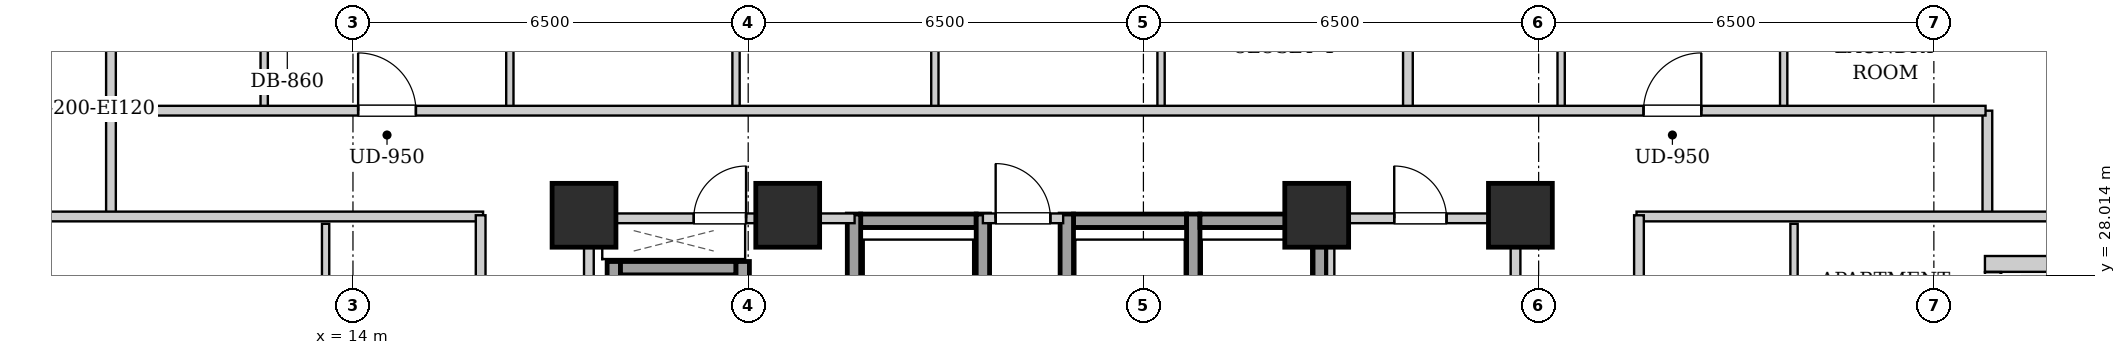
"""IFC4 building model, lengths in metres.
Left out: names, types, materials, properties, quantities, classifications, styles, units other than length and angle.
Written with IfcOpenShell. Run it as: python <this file> out.ifc"""

import sys

from ifc_helpers import new_model, si_unit, direction, frame, frame_2d, origin, origin_2d, place, context, subcontext, project, spatial, rectangle, extrude, element, fill, save


model = new_model("IFC4")
c1 = context("Model", 3, precision=1e-05, world=origin(), true_north=direction((0.0, 1.0)))
c2 = subcontext(c1, "Body", "Model", "MODEL_VIEW")
j1 = project(units=[si_unit("LENGTHUNIT", "METRE"), si_unit("PLANEANGLEUNIT", "RADIAN")], contexts=[c1])
p1 = place(None, origin())
s1 = spatial("IfcSite", under=j1, at=p1, CompositionType="ELEMENT")
p2 = place(p1, origin())
s2 = spatial("IfcBuilding", under=s1, at=p2, CompositionType="ELEMENT")
p3 = place(p2, frame((0.0, 0.0, 84.7)))
s3 = spatial("IfcBuildingStorey", under=s2, at=p3, CompositionType="ELEMENT", Elevation=84.7)
for number, where, z_axis, x_axis in (
    (1, (17.8, 29.0, 0.0), (0.0, 0.0, 1.0), (1.0, 0.0, 0.0)),
    (2, (21.15, 29.0, 0.0), (0.0, 0.0, 1.0), (1.0, 0.0, 0.0)),
    (3, (29.85, 29.0, 0.0), (0.0, 0.0, 1.0), (1.0, 0.0, 0.0)),
    (4, (33.2, 29.0, 0.0), (0.0, 0.0, 1.0), (1.0, 0.0, 0.0)),
):
    element("IfcColumn", number, at=place(p3, frame(where, z_axis=z_axis, x_axis=x_axis)), inside=s3, PredefinedType="COLUMN", context=c2, shape_type="SweptSolid", body=[
        extrude(rectangle(XDim=1.05, YDim=1.05, at=origin_2d()), origin(), (0.0, 0.0, 1.0), 3.2),
    ])
p4 = place(p3, frame((43.24, 28.2, 0.0), z_axis=(0.0, 0.0, 1.0), x_axis=(-1.0, 0.0, 0.0)))
e5 = element("IfcWall", 5, at=p4, inside=s3, PredefinedType="SOLIDWALL", context=c2, shape_type="SweptSolid", body=[
    extrude(rectangle(XDim=2.4, YDim=0.26, at=frame_2d((1.2, 0.0))), origin(), (0.0, 0.0, 1.0), 2.94),
])
p5 = place(p3, frame((40.97, 28.066, 0.0), z_axis=(0.0, 0.0, 1.0), x_axis=(0.0, -1.0, 0.0)))
e6 = element("IfcWall", 6, at=p5, inside=s3, PredefinedType="SOLIDWALL", context=c2, shape_type="SweptSolid", body=[
    extrude(rectangle(XDim=3.332, YDim=0.26, at=frame_2d((1.666, 0.0))), origin(), (0.0, 0.0, 1.0), 2.94),
])
p6 = place(p5, frame((1.116, 0.0, 0.0)))
e7 = element("IfcOpeningElement", 7, at=p6, cuts=e6, PredefinedType="OPENING", context=c2, shape_type="SweptSolid", body=[
    extrude(rectangle(XDim=1.1, YDim=2.0, at=frame_2d((0.55, 1.0))), frame((0.0, 0.14, 0.0), z_axis=(0.0, -1.0, 0.0), x_axis=(1.0, 0.0, 0.0)), (0.0, 0.0, 1.0), 0.28),
])
p7 = place(p5, frame((0.276, 0.0, 0.55)))
e8 = element("IfcOpeningElement", 8, at=p7, cuts=e6, PredefinedType="OPENING", context=c2, shape_type="SweptSolid", body=[
    extrude(rectangle(XDim=0.68, YDim=1.2, at=frame_2d((0.34, 0.6))), frame((0.0, 0.14, 0.0), z_axis=(0.0, -1.0, 0.0), x_axis=(1.0, 0.0, 0.0)), (0.0, 0.0, 1.0), 0.28),
])
p8 = place(p3, frame((22.35, 28.91, 0.0), z_axis=(0.0, 0.0, 1.0), x_axis=(1.0, 0.0, 0.0)))
e9 = element("IfcWall", 9, at=p8, inside=s3, PredefinedType="SHEAR", context=c2, shape_type="SweptSolid", body=[
    extrude(rectangle(XDim=1.9, YDim=0.22, at=frame_2d((0.95, 0.0))), origin(), (0.0, 0.0, 1.0), 2.94),
])
for number, where, z_axis, x_axis in (
    (10, (22.24, 26.58, 0.0), (0.0, 0.0, 1.0), (0.0, 1.0, 0.0)),
    (11, (24.36, 26.58, 0.0), (0.0, 0.0, 1.0), (0.0, 1.0, 0.0)),
):
    element("IfcWall", number, at=place(p3, frame(where, z_axis=z_axis, x_axis=x_axis)), inside=s3, PredefinedType="SHEAR", context=c2, shape_type="SweptSolid", body=[
        extrude(rectangle(XDim=2.44, YDim=0.22, at=frame_2d((1.22, 0.0))), origin(), (0.0, 0.0, 1.0), 2.94),
    ])
p9 = place(p3, frame((25.85, 28.91, 0.0), z_axis=(0.0, 0.0, 1.0), x_axis=(1.0, 0.0, 0.0)))
e12 = element("IfcWall", 12, at=p9, inside=s3, PredefinedType="SHEAR", context=c2, shape_type="SweptSolid", body=[
    extrude(rectangle(XDim=1.86, YDim=0.22, at=frame_2d((0.93, 0.0))), origin(), (0.0, 0.0, 1.0), 2.94),
])
for number, where, z_axis, x_axis in (
    (13, (25.74, 26.58, 0.0), (0.0, 0.0, 1.0), (0.0, 1.0, 0.0)),
    (14, (27.82, 26.58, 0.0), (0.0, 0.0, 1.0), (0.0, 1.0, 0.0)),
):
    element("IfcWall", number, at=place(p3, frame(where, z_axis=z_axis, x_axis=x_axis)), inside=s3, PredefinedType="SHEAR", context=c2, shape_type="SweptSolid", body=[
        extrude(rectangle(XDim=2.44, YDim=0.22, at=frame_2d((1.22, 0.0))), origin(), (0.0, 0.0, 1.0), 2.94),
    ])
p10 = place(p3, frame((27.93, 28.91, 0.0), z_axis=(0.0, 0.0, 1.0), x_axis=(1.0, 0.0, 0.0)))
e15 = element("IfcWall", 15, at=p10, inside=s3, PredefinedType="SHEAR", context=c2, shape_type="SweptSolid", body=[
    extrude(rectangle(XDim=1.86, YDim=0.22, at=frame_2d((0.93, 0.0))), origin(), (0.0, 0.0, 1.0), 2.94),
])
p11 = place(p3, frame((29.9, 26.58, 0.0), z_axis=(0.0, 0.0, 1.0), x_axis=(0.0, 1.0, 0.0)))
e16 = element("IfcWall", 16, at=p11, inside=s3, PredefinedType="SHEAR", context=c2, shape_type="SweptSolid", body=[
    extrude(rectangle(XDim=2.44, YDim=0.22, at=frame_2d((1.22, 0.0))), origin(), (0.0, 0.0, 1.0), 2.94),
])
p12 = place(p3, frame((18.29, 24.1, 0.0), z_axis=(0.0, 0.0, 1.0), x_axis=(0.0, 1.0, 0.0)))
e17 = element("IfcWall", 17, at=p12, inside=s3, PredefinedType="SHEAR", context=c2, shape_type="SweptSolid", body=[
    extrude(rectangle(XDim=4.14, YDim=0.22, at=frame_2d((2.07, 0.0))), origin(), (0.0, 0.0, 1.0), 2.94),
])
p13 = place(p3, frame((18.4, 28.13, 0.0), z_axis=(0.0, 0.0, 1.0), x_axis=(1.0, 0.0, 0.0)))
e18 = element("IfcWall", 18, at=p13, inside=s3, PredefinedType="SHEAR", context=c2, shape_type="SweptSolid", body=[
    extrude(rectangle(XDim=1.9, YDim=0.22, at=frame_2d((0.95, 0.0))), origin(), (0.0, 0.0, 1.0), 2.94),
])
p14 = place(p3, frame((20.41, 26.06, 0.0), z_axis=(0.0, 0.0, 1.0), x_axis=(0.0, 1.0, 0.0)))
e19 = element("IfcWall", 19, at=p14, inside=s3, PredefinedType="SHEAR", context=c2, shape_type="SweptSolid", body=[
    extrude(rectangle(XDim=2.18, YDim=0.22, at=frame_2d((1.09, 0.0))), origin(), (0.0, 0.0, 1.0), 2.94),
])
for number, where, z_axis, x_axis in (
    (20, (17.88, 24.12, 0.0), (0.0, 0.0, 1.0), (0.0, 1.0, 0.0)),
    (21, (33.12, 24.12, 0.0), (0.0, 0.0, 1.0), (0.0, 1.0, 0.0)),
):
    element("IfcWall", number, at=place(p3, frame(where, z_axis=z_axis, x_axis=x_axis)), inside=s3, PredefinedType="PARTITIONING", context=c2, shape_type="SweptSolid", body=[
        extrude(rectangle(XDim=4.76, YDim=0.16, at=frame_2d((2.38, 0.0))), origin(), (0.0, 0.0, 1.0), 2.94),
    ])
p15 = place(p3, frame((24.36, 28.95, 0.0), z_axis=(0.0, 0.0, 1.0), x_axis=(1.0, 0.0, 0.0)))
e22 = element("IfcWall", 22, at=p15, inside=s3, PredefinedType="PARTITIONING", context=c2, shape_type="SweptSolid", body=[
    extrude(rectangle(XDim=1.32, YDim=0.16, at=frame_2d((0.66, 0.0))), origin(), (0.0, 0.0, 1.0), 2.309),
])
p16 = place(p15, frame((0.21, 0.0, 0.0)))
e23 = element("IfcOpeningElement", 23, at=p16, cuts=e22, PredefinedType="OPENING", context=c2, shape_type="SweptSolid", body=[
    extrude(rectangle(XDim=0.9, YDim=2.05, at=frame_2d((0.45, 1.025))), frame((0.0, 0.09, 0.0), z_axis=(0.0, -1.0, 0.0), x_axis=(1.0, 0.0, 0.0)), (0.0, 0.0, 1.0), 0.18),
])
p17 = place(p3, frame((17.96, 28.95, 0.0), z_axis=(0.0, 0.0, 1.0), x_axis=(1.0, 0.0, 0.0)))
e24 = element("IfcWall", 24, at=p17, inside=s3, PredefinedType="PARTITIONING", context=c2, shape_type="SweptSolid", body=[
    extrude(rectangle(XDim=4.29, YDim=0.16, at=frame_2d((2.145, 0.0))), origin(), (0.0, 0.0, 1.0), 2.309),
])
p18 = place(p17, frame((1.645, 0.0, 0.0)))
e25 = element("IfcOpeningElement", 25, at=p18, cuts=e24, PredefinedType="OPENING", context=c2, shape_type="SweptSolid", body=[
    extrude(rectangle(XDim=0.86, YDim=2.05, at=frame_2d((0.43, 1.025))), frame((0.0, 0.09, 0.0), z_axis=(0.0, -1.0, 0.0), x_axis=(1.0, 0.0, 0.0)), (0.0, 0.0, 1.0), 0.18),
])
p19 = place(p3, frame((30.08, 26.18, 0.0), z_axis=(0.0, 0.0, 1.0), x_axis=(0.0, 1.0, 0.0)))
e26 = element("IfcWall", 26, at=p19, inside=s3, PredefinedType="PARTITIONING", context=c2, shape_type="SweptSolid", body=[
    extrude(rectangle(XDim=2.68, YDim=0.12, at=frame_2d((1.34, 0.0))), origin(), (0.0, 0.0, 1.0), 2.94),
])
p20 = place(p3, frame((30.08, 28.95, 0.0), z_axis=(0.0, 0.0, 1.0), x_axis=(1.0, 0.0, 0.0)))
e27 = element("IfcWall", 27, at=p20, inside=s3, PredefinedType="PARTITIONING", context=c2, shape_type="SweptSolid", body=[
    extrude(rectangle(XDim=2.96, YDim=0.16, at=frame_2d((1.48, 0.0))), origin(), (0.0, 0.0, 1.0), 2.94),
])
p21 = place(p20, frame((1.045, 0.0, 0.0)))
e28 = element("IfcOpeningElement", 28, at=p21, cuts=e27, PredefinedType="OPENING", context=c2, shape_type="SweptSolid", body=[
    extrude(rectangle(XDim=0.86, YDim=2.05, at=frame_2d((0.43, 1.025))), frame((0.0, 0.09, 0.0), z_axis=(0.0, -1.0, 0.0), x_axis=(1.0, 0.0, 0.0)), (0.0, 0.0, 1.0), 0.18),
])
for number, where, z_axis, x_axis in (
    (29, (10.02, 28.98, 0.0), (0.0, 0.0, 1.0), (0.0, 1.0, 0.0)),
    (30, (40.88, 28.98, 0.0), (0.0, 0.0, 1.0), (0.0, 1.0, 0.0)),
):
    element("IfcWall", number, at=place(p3, frame(where, z_axis=z_axis, x_axis=x_axis)), inside=s3, PredefinedType="PARTITIONING", context=c2, shape_type="SweptSolid", body=[
        extrude(rectangle(XDim=1.74, YDim=0.16, at=frame_2d((0.87, 0.0))), origin(), (0.0, 0.0, 1.0), 2.94),
    ])
p22 = place(p3, frame((7.78, 28.98, 0.0), z_axis=(0.0, 0.0, 1.0), x_axis=(1.0, 0.0, 0.0)))
e31 = element("IfcWall", 31, at=p22, inside=s3, PredefinedType="PARTITIONING", context=c2, shape_type="SweptSolid", body=[
    extrude(rectangle(XDim=8.36, YDim=0.16, at=frame_2d((4.18, 0.0))), origin(), (0.0, 0.0, 1.0), 2.309),
])
p23 = place(p3, frame((35.11, 28.98, 0.0), z_axis=(0.0, 0.0, 1.0), x_axis=(1.0, 0.0, 0.0)))
e32 = element("IfcWall", 32, at=p23, inside=s3, PredefinedType="PARTITIONING", context=c2, shape_type="SweptSolid", body=[
    extrude(rectangle(XDim=8.01, YDim=0.16, at=frame_2d((4.005, 0.0))), origin(), (0.0, 0.0, 1.0), 2.309),
])
p24 = place(p3, frame((10.02, 30.76, 0.0), z_axis=(0.0, 0.0, 1.0), x_axis=(0.0, 1.0, 0.0)))
e33 = element("IfcWall", 33, at=p24, inside=s3, PredefinedType="PARTITIONING", context=c2, shape_type="SweptSolid", body=[
    extrude(rectangle(XDim=2.91, YDim=0.16, at=frame_2d((1.455, 0.0))), origin(), (0.0, 0.0, 1.0), 2.94),
])
p25 = place(p3, frame((12.54, 30.76, 0.0), z_axis=(0.0, 0.0, 1.0), x_axis=(0.0, 1.0, 0.0)))
e34 = element("IfcWall", 34, at=p25, inside=s3, PredefinedType="PARTITIONING", context=c2, shape_type="SweptSolid", body=[
    extrude(rectangle(XDim=2.85, YDim=0.12, at=frame_2d((1.425, 0.0))), origin(), (0.0, 0.0, 1.0), 2.94),
])
p26 = place(p25, frame((0.995, 0.0, 0.0)))
e35 = element("IfcOpeningElement", 35, at=p26, cuts=e34, PredefinedType="OPENING", context=c2, shape_type="SweptSolid", body=[
    extrude(rectangle(XDim=0.86, YDim=2.05, at=frame_2d((0.43, 1.025))), frame((0.0, 0.07, 0.0), z_axis=(0.0, -1.0, 0.0), x_axis=(1.0, 0.0, 0.0)), (0.0, 0.0, 1.0), 0.14),
])
p27 = place(p3, frame((16.58, 30.76, 0.0), z_axis=(0.0, 0.0, 1.0), x_axis=(0.0, 1.0, 0.0)))
e36 = element("IfcWall", 36, at=p27, inside=s3, PredefinedType="PARTITIONING", context=c2, shape_type="SweptSolid", body=[
    extrude(rectangle(XDim=2.85, YDim=0.12, at=frame_2d((1.425, 0.0))), origin(), (0.0, 0.0, 1.0), 2.94),
])
p28 = place(p27, frame((0.975, 0.0, 0.0)))
e37 = element("IfcOpeningElement", 37, at=p28, cuts=e36, PredefinedType="OPENING", context=c2, shape_type="SweptSolid", body=[
    extrude(rectangle(XDim=0.9, YDim=2.05, at=frame_2d((0.45, 1.025))), frame((0.0, 0.07, 0.0), z_axis=(0.0, -1.0, 0.0), x_axis=(1.0, 0.0, 0.0)), (0.0, 0.0, 1.0), 0.14),
])
p29 = place(p3, frame((20.3, 30.76, 0.0), z_axis=(0.0, 0.0, 1.0), x_axis=(0.0, 1.0, 0.0)))
e38 = element("IfcWall", 38, at=p29, inside=s3, PredefinedType="PARTITIONING", context=c2, shape_type="SweptSolid", body=[
    extrude(rectangle(XDim=2.85, YDim=0.12, at=frame_2d((1.425, 0.0))), origin(), (0.0, 0.0, 1.0), 2.94),
])
p30 = place(p29, frame((0.975, 0.0, 0.0)))
e39 = element("IfcOpeningElement", 39, at=p30, cuts=e38, PredefinedType="OPENING", context=c2, shape_type="SweptSolid", body=[
    extrude(rectangle(XDim=0.9, YDim=2.05, at=frame_2d((0.45, 1.025))), frame((0.0, 0.07, 0.0), z_axis=(0.0, -1.0, 0.0), x_axis=(1.0, 0.0, 0.0)), (0.0, 0.0, 1.0), 0.14),
])
p31 = place(p3, frame((23.57, 30.76, 0.0), z_axis=(0.0, 0.0, 1.0), x_axis=(0.0, 1.0, 0.0)))
e40 = element("IfcWall", 40, at=p31, inside=s3, PredefinedType="PARTITIONING", context=c2, shape_type="SweptSolid", body=[
    extrude(rectangle(XDim=2.85, YDim=0.12, at=frame_2d((1.425, 0.0))), origin(), (0.0, 0.0, 1.0), 2.94),
])
p32 = place(p31, frame((0.975, 0.0, 0.0)))
e41 = element("IfcOpeningElement", 41, at=p32, cuts=e40, PredefinedType="OPENING", context=c2, shape_type="SweptSolid", body=[
    extrude(rectangle(XDim=0.9, YDim=2.05, at=frame_2d((0.45, 1.025))), frame((0.0, 0.07, 0.0), z_axis=(0.0, -1.0, 0.0), x_axis=(1.0, 0.0, 0.0)), (0.0, 0.0, 1.0), 0.14),
])
p33 = place(p3, frame((27.29, 30.76, 0.0), z_axis=(0.0, 0.0, 1.0), x_axis=(0.0, 1.0, 0.0)))
e42 = element("IfcWall", 42, at=p33, inside=s3, PredefinedType="PARTITIONING", context=c2, shape_type="SweptSolid", body=[
    extrude(rectangle(XDim=2.85, YDim=0.12, at=frame_2d((1.425, 0.0))), origin(), (0.0, 0.0, 1.0), 2.94),
])
p34 = place(p33, frame((0.975, 0.0, 0.0)))
e43 = element("IfcOpeningElement", 43, at=p34, cuts=e42, PredefinedType="OPENING", context=c2, shape_type="SweptSolid", body=[
    extrude(rectangle(XDim=0.9, YDim=2.05, at=frame_2d((0.45, 1.025))), frame((0.0, 0.07, 0.0), z_axis=(0.0, -1.0, 0.0), x_axis=(1.0, 0.0, 0.0)), (0.0, 0.0, 1.0), 0.14),
])
p35 = place(p3, frame((31.35, 30.76, 0.0), z_axis=(0.0, 0.0, 1.0), x_axis=(0.0, 1.0, 0.0)))
e44 = element("IfcWall", 44, at=p35, inside=s3, PredefinedType="PARTITIONING", context=c2, shape_type="SweptSolid", body=[
    extrude(rectangle(XDim=12.26, YDim=0.16, at=frame_2d((6.13, 0.0))), origin(), (0.0, 0.0, 1.0), 2.94),
])
p36 = place(p3, frame((33.87, 30.76, 0.0), z_axis=(0.0, 0.0, 1.0), x_axis=(0.0, 1.0, 0.0)))
e45 = element("IfcWall", 45, at=p36, inside=s3, PredefinedType="PARTITIONING", context=c2, shape_type="SweptSolid", body=[
    extrude(rectangle(XDim=2.85, YDim=0.12, at=frame_2d((1.425, 0.0))), origin(), (0.0, 0.0, 1.0), 2.94),
])
p37 = place(p36, frame((0.995, 0.0, 0.0)))
e46 = element("IfcOpeningElement", 46, at=p37, cuts=e45, PredefinedType="OPENING", context=c2, shape_type="SweptSolid", body=[
    extrude(rectangle(XDim=0.86, YDim=2.05, at=frame_2d((0.43, 1.025))), frame((0.0, 0.07, 0.0), z_axis=(0.0, -1.0, 0.0), x_axis=(1.0, 0.0, 0.0)), (0.0, 0.0, 1.0), 0.14),
])
p38 = place(p3, frame((37.53, 30.76, 0.0), z_axis=(0.0, 0.0, 1.0), x_axis=(0.0, 1.0, 0.0)))
e47 = element("IfcWall", 47, at=p38, inside=s3, PredefinedType="PARTITIONING", context=c2, shape_type="SweptSolid", body=[
    extrude(rectangle(XDim=2.85, YDim=0.12, at=frame_2d((1.425, 0.0))), origin(), (0.0, 0.0, 1.0), 2.94),
])
p39 = place(p38, frame((0.975, 0.0, 0.0)))
e48 = element("IfcOpeningElement", 48, at=p39, cuts=e47, PredefinedType="OPENING", context=c2, shape_type="SweptSolid", body=[
    extrude(rectangle(XDim=0.9, YDim=2.05, at=frame_2d((0.45, 1.025))), frame((0.0, 0.07, 0.0), z_axis=(0.0, -1.0, 0.0), x_axis=(1.0, 0.0, 0.0)), (0.0, 0.0, 1.0), 0.14),
])
p40 = place(p3, frame((13.55, 24.552, 0.0), z_axis=(0.0, 0.0, 1.0), x_axis=(0.0, 1.0, 0.0)))
e49 = element("IfcWall", 49, at=p40, inside=s3, PredefinedType="PARTITIONING", context=c2, shape_type="SweptSolid", body=[
    extrude(rectangle(XDim=4.308, YDim=0.12, at=frame_2d((2.154, 0.0))), origin(), (0.0, 0.0, 1.0), 2.94),
])
p41 = place(p40, frame((1.704, 0.0, 0.0)))
e50 = element("IfcOpeningElement", 50, at=p41, cuts=e49, PredefinedType="OPENING", context=c2, shape_type="SweptSolid", body=[
    extrude(rectangle(XDim=0.9, YDim=2.05, at=frame_2d((0.45, 1.025))), frame((0.0, 0.07, 0.0), z_axis=(0.0, -1.0, 0.0), x_axis=(1.0, 0.0, 0.0)), (0.0, 0.0, 1.0), 0.14),
])
p42 = place(p3, frame((37.7, 24.552, 0.0), z_axis=(0.0, 0.0, 1.0), x_axis=(0.0, 1.0, 0.0)))
e51 = element("IfcWall", 51, at=p42, inside=s3, PredefinedType="PARTITIONING", context=c2, shape_type="SweptSolid", body=[
    extrude(rectangle(XDim=4.308, YDim=0.12, at=frame_2d((2.154, 0.0))), origin(), (0.0, 0.0, 1.0), 2.94),
])
p43 = place(p42, frame((1.704, 0.0, 0.0)))
e52 = element("IfcOpeningElement", 52, at=p43, cuts=e51, PredefinedType="OPENING", context=c2, shape_type="SweptSolid", body=[
    extrude(rectangle(XDim=0.9, YDim=2.05, at=frame_2d((0.45, 1.025))), frame((0.0, 0.07, 0.0), z_axis=(0.0, -1.0, 0.0), x_axis=(1.0, 0.0, 0.0)), (0.0, 0.0, 1.0), 0.14),
])
p44 = place(p3, frame((10.05, 30.72, 0.0), z_axis=(0.0, 0.0, 1.0), x_axis=(1.0, 0.0, 0.0)))
e53 = element("IfcWall", 53, at=p44, inside=s3, PredefinedType="PARTITIONING", context=c2, shape_type="SweptSolid", body=[
    extrude(rectangle(XDim=30.8, YDim=0.16, at=frame_2d((15.4, 0.0))), origin(), (0.0, 0.0, 1.0), 2.94),
])
p45 = place(p44, frame((4.035, 0.0, 0.0)))
e54 = element("IfcOpeningElement", 54, at=p45, cuts=e53, PredefinedType="OPENING", context=c2, shape_type="SweptSolid", body=[
    extrude(rectangle(XDim=0.95, YDim=2.1, at=frame_2d((0.475, 1.05))), frame((0.0, 0.09, 0.0), z_axis=(0.0, -1.0, 0.0), x_axis=(1.0, 0.0, 0.0)), (0.0, 0.0, 1.0), 0.18),
])
p46 = place(p44, frame((25.175, 0.0, 0.0)))
e55 = element("IfcOpeningElement", 55, at=p46, cuts=e53, PredefinedType="OPENING", context=c2, shape_type="SweptSolid", body=[
    extrude(rectangle(XDim=0.95, YDim=2.1, at=frame_2d((0.475, 1.05))), frame((0.0, 0.09, 0.0), z_axis=(0.0, -1.0, 0.0), x_axis=(1.0, 0.0, 0.0)), (0.0, 0.0, 1.0), 0.18),
])
p47 = place(p3, frame((16.1, 15.07, 0.0), z_axis=(0.0, 0.0, 1.0), x_axis=(0.0, 1.0, 0.0)))
e56 = element("IfcWall", 56, at=p47, inside=s3, PredefinedType="PARTITIONING", context=c2, shape_type="SweptSolid", body=[
    extrude(rectangle(XDim=13.93, YDim=0.16, at=frame_2d((6.965, 0.0))), origin(), (0.0, 0.0, 1.0), 2.94),
])
p48 = place(p47, frame((4.385, 0.0, 0.0)))
e57 = element("IfcOpeningElement", 57, at=p48, cuts=e56, PredefinedType="OPENING", context=c2, shape_type="SweptSolid", body=[
    extrude(rectangle(XDim=0.95, YDim=2.1, at=frame_2d((0.475, 1.05))), frame((0.0, 0.09, 0.0), z_axis=(0.0, -1.0, 0.0), x_axis=(1.0, 0.0, 0.0)), (0.0, 0.0, 1.0), 0.18),
])
p49 = place(p3, frame((35.15, 15.07, 0.0), z_axis=(0.0, 0.0, 1.0), x_axis=(0.0, 1.0, 0.0)))
e58 = element("IfcWall", 58, at=p49, inside=s3, PredefinedType="PARTITIONING", context=c2, shape_type="SweptSolid", body=[
    extrude(rectangle(XDim=13.93, YDim=0.16, at=frame_2d((6.965, 0.0))), origin(), (0.0, 0.0, 1.0), 2.94),
])
p50 = place(p49, frame((4.385, 0.0, 0.0)))
e59 = element("IfcOpeningElement", 59, at=p50, cuts=e58, PredefinedType="OPENING", context=c2, shape_type="SweptSolid", body=[
    extrude(rectangle(XDim=0.95, YDim=2.1, at=frame_2d((0.475, 1.05))), frame((0.0, 0.09, 0.0), z_axis=(0.0, -1.0, 0.0), x_axis=(1.0, 0.0, 0.0)), (0.0, 0.0, 1.0), 0.18),
])
p51 = place(p16, origin())
e60 = element("IfcDoor", 60, at=p51, inside=s3, OperationType="SINGLE_SWING_LEFT", PredefinedType="DOOR", context=c2, shape_type="SweptSolid", body=[
    extrude(rectangle(XDim=0.9, YDim=2.05, at=frame_2d((0.45, 1.025))), frame((0.0, 0.025, 0.0), z_axis=(0.0, -1.0, 0.0), x_axis=(1.0, 0.0, 0.0)), (0.0, 0.0, 1.0), 0.05),
])
fill(e23, e60)
p52 = place(p18, origin())
e61 = element("IfcDoor", 61, at=p52, inside=s3, OperationType="SINGLE_SWING_RIGHT", PredefinedType="DOOR", context=c2, shape_type="SweptSolid", body=[
    extrude(rectangle(XDim=0.86, YDim=2.05, at=frame_2d((0.43, 1.025))), frame((0.0, 0.025, 0.0), z_axis=(0.0, -1.0, 0.0), x_axis=(1.0, 0.0, 0.0)), (0.0, 0.0, 1.0), 0.05),
])
fill(e25, e61)
p53 = place(p21, origin())
e62 = element("IfcDoor", 62, at=p53, inside=s3, OperationType="SINGLE_SWING_LEFT", PredefinedType="DOOR", context=c2, shape_type="SweptSolid", body=[
    extrude(rectangle(XDim=0.86, YDim=2.05, at=frame_2d((0.43, 1.025))), frame((0.0, 0.025, 0.0), z_axis=(0.0, -1.0, 0.0), x_axis=(1.0, 0.0, 0.0)), (0.0, 0.0, 1.0), 0.05),
])
fill(e28, e62)
p54 = place(p45, origin())
e63 = element("IfcDoor", 63, at=p54, inside=s3, OperationType="SINGLE_SWING_LEFT", PredefinedType="DOOR", context=c2, shape_type="SweptSolid", body=[
    extrude(rectangle(XDim=0.95, YDim=2.1, at=frame_2d((0.475, 1.05))), frame((0.0, 0.025, 0.0), z_axis=(0.0, -1.0, 0.0), x_axis=(1.0, 0.0, 0.0)), (0.0, 0.0, 1.0), 0.05),
])
fill(e54, e63)
p55 = place(p46, origin())
e64 = element("IfcDoor", 64, at=p55, inside=s3, OperationType="SINGLE_SWING_RIGHT", PredefinedType="DOOR", context=c2, shape_type="SweptSolid", body=[
    extrude(rectangle(XDim=0.95, YDim=2.1, at=frame_2d((0.475, 1.05))), frame((0.0, 0.025, 0.0), z_axis=(0.0, -1.0, 0.0), x_axis=(1.0, 0.0, 0.0)), (0.0, 0.0, 1.0), 0.05),
])
fill(e55, e64)
save(model, sys.argv[1])
